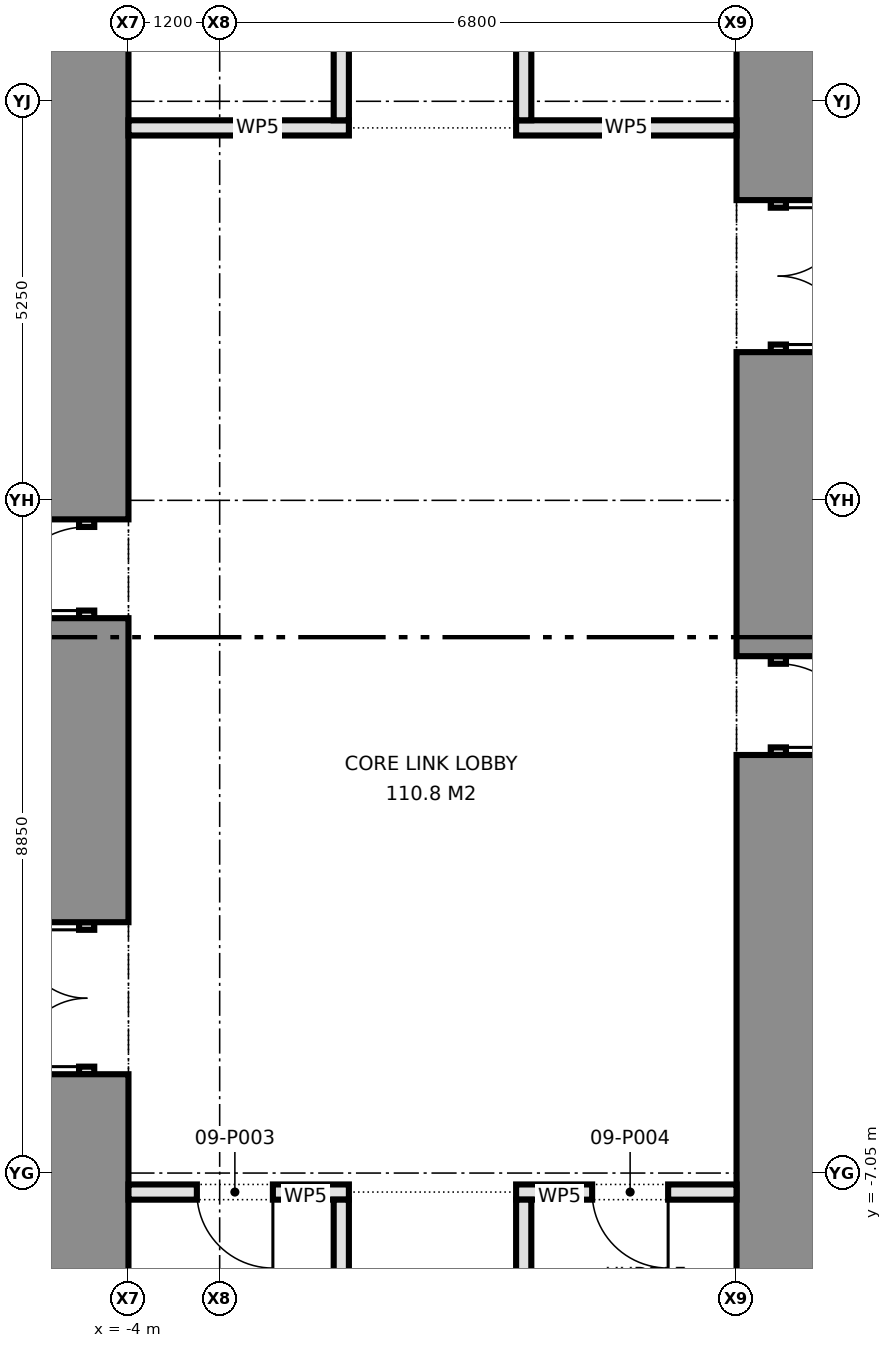
"""IFC4 building model, lengths in metres.
Left out: names, types, materials, properties, quantities, classifications, styles, units other than length and angle.
Written with IfcOpenShell. Run it as: python <this file> out.ifc"""

import sys

from ifc_helpers import new_model, si_unit, direction, frame, frame_2d, origin, place, context, subcontext, project, spatial, rectangle, extrude, element, fill, save


model = new_model("IFC4")
c1 = context("Model", 3, precision=1e-05, world=origin(), true_north=direction((0.0, 1.0)))
c2 = subcontext(c1, "Body", "Model", "MODEL_VIEW")
j1 = project(units=[si_unit("LENGTHUNIT", "METRE"), si_unit("PLANEANGLEUNIT", "RADIAN")], contexts=[c1])
p1 = place(None, origin())
s1 = spatial("IfcSite", under=j1, at=p1, CompositionType="ELEMENT")
p2 = place(p1, origin())
s2 = spatial("IfcBuilding", under=s1, at=p2, CompositionType="ELEMENT")
p3 = place(p2, frame((0.0, 0.0, 40.1)))
s3 = spatial("IfcBuildingStorey", under=s2, at=p3, CompositionType="ELEMENT", Elevation=40.1)
p4 = place(p3, frame((-4.55, -8.9, 0.0), z_axis=(0.0, 0.0, 1.0), x_axis=(0.0, 1.0, 0.0)))
e1 = element("IfcWall", 1, at=p4, inside=s3, PredefinedType="SHEAR", context=c2, shape_type="SweptSolid", body=[
    extrude(rectangle(XDim=3.15, YDim=1.1, at=frame_2d((1.575, 0.0))), origin(), (0.0, 0.0, 1.0), 4.575),
])
p5 = place(p3, frame((-4.55, -5.75, 0.0), z_axis=(0.0, 0.0, 1.0), x_axis=(0.0, 1.0, 0.0)))
e2 = element("IfcWall", 2, at=p5, inside=s3, PredefinedType="PARTITIONING", context=c2, shape_type="SweptSolid", body=[
    extrude(rectangle(XDim=2.0, YDim=0.2, at=frame_2d((1.0, 0.0))), origin(), (0.0, 0.0, 1.0), 2.4),
])
p6 = place(p5, frame((0.1, 0.0, 0.0)))
e3 = element("IfcOpeningElement", 3, at=p6, cuts=e2, PredefinedType="OPENING", context=c2, shape_type="SweptSolid", body=[
    extrude(rectangle(XDim=1.8, YDim=2.1, at=frame_2d((0.9, 1.05))), frame((0.0, 0.11, 0.0), z_axis=(0.0, -1.0, 0.0), x_axis=(1.0, 0.0, 0.0)), (0.0, 0.0, 1.0), 0.22),
])
p7 = place(p3, frame((-4.55, -3.75, 0.0), z_axis=(0.0, 0.0, 1.0), x_axis=(0.0, 1.0, 0.0)))
e4 = element("IfcWall", 4, at=p7, inside=s3, PredefinedType="SHEAR", context=c2, shape_type="SweptSolid", body=[
    extrude(rectangle(XDim=4.0, YDim=1.1, at=frame_2d((2.0, 0.0))), origin(), (0.0, 0.0, 1.0), 4.575),
])
p8 = place(p3, frame((-4.55, 0.25, 0.0), z_axis=(0.0, 0.0, 1.0), x_axis=(0.0, 1.0, 0.0)))
e5 = element("IfcWall", 5, at=p8, inside=s3, PredefinedType="PARTITIONING", context=c2, shape_type="SweptSolid", body=[
    extrude(rectangle(XDim=1.3, YDim=0.2, at=frame_2d((0.65, 0.0))), origin(), (0.0, 0.0, 1.0), 2.4),
])
p9 = place(p8, frame((0.1, 0.0, 0.0)))
e6 = element("IfcOpeningElement", 6, at=p9, cuts=e5, PredefinedType="OPENING", context=c2, shape_type="SweptSolid", body=[
    extrude(rectangle(XDim=1.1, YDim=2.1, at=frame_2d((0.55, 1.05))), frame((0.0, 0.11, 0.0), z_axis=(0.0, -1.0, 0.0), x_axis=(1.0, 0.0, 0.0)), (0.0, 0.0, 1.0), 0.22),
])
p10 = place(p3, frame((-4.55, 1.55, 0.0), z_axis=(0.0, 0.0, 1.0), x_axis=(0.0, 1.0, 0.0)))
e7 = element("IfcWall", 7, at=p10, inside=s3, PredefinedType="SHEAR", context=c2, shape_type="SweptSolid", body=[
    extrude(rectangle(XDim=7.35, YDim=1.1, at=frame_2d((3.675, 0.0))), origin(), (0.0, 0.0, 1.0), 4.575),
])
p11 = place(p3, frame((4.55, 8.9, 0.0), z_axis=(0.0, 0.0, 1.0), x_axis=(0.0, -1.0, 0.0)))
e8 = element("IfcWall", 8, at=p11, inside=s3, PredefinedType="SHEAR", context=c2, shape_type="SweptSolid", body=[
    extrude(rectangle(XDim=3.15, YDim=1.1, at=frame_2d((1.575, 0.0))), origin(), (0.0, 0.0, 1.0), 4.575),
])
p12 = place(p3, frame((4.55, 5.75, 0.0), z_axis=(0.0, 0.0, 1.0), x_axis=(0.0, -1.0, 0.0)))
e9 = element("IfcWall", 9, at=p12, inside=s3, PredefinedType="PARTITIONING", context=c2, shape_type="SweptSolid", body=[
    extrude(rectangle(XDim=2.0, YDim=0.2, at=frame_2d((1.0, 0.0))), origin(), (0.0, 0.0, 1.0), 2.4),
])
p13 = place(p12, frame((0.1, 0.0, 0.0)))
e10 = element("IfcOpeningElement", 10, at=p13, cuts=e9, PredefinedType="OPENING", context=c2, shape_type="SweptSolid", body=[
    extrude(rectangle(XDim=1.8, YDim=2.1, at=frame_2d((0.9, 1.05))), frame((0.0, 0.11, 0.0), z_axis=(0.0, -1.0, 0.0), x_axis=(1.0, 0.0, 0.0)), (0.0, 0.0, 1.0), 0.22),
])
p14 = place(p3, frame((4.55, 3.75, 0.0), z_axis=(0.0, 0.0, 1.0), x_axis=(0.0, -1.0, 0.0)))
e11 = element("IfcWall", 11, at=p14, inside=s3, PredefinedType="SHEAR", context=c2, shape_type="SweptSolid", body=[
    extrude(rectangle(XDim=4.0, YDim=1.1, at=frame_2d((2.0, 0.0))), origin(), (0.0, 0.0, 1.0), 4.575),
])
p15 = place(p3, frame((4.55, -0.25, 0.0), z_axis=(0.0, 0.0, 1.0), x_axis=(0.0, -1.0, 0.0)))
e12 = element("IfcWall", 12, at=p15, inside=s3, PredefinedType="PARTITIONING", context=c2, shape_type="SweptSolid", body=[
    extrude(rectangle(XDim=1.3, YDim=0.2, at=frame_2d((0.65, 0.0))), origin(), (0.0, 0.0, 1.0), 2.4),
])
p16 = place(p15, frame((0.1, 0.0, 0.0)))
e13 = element("IfcOpeningElement", 13, at=p16, cuts=e12, PredefinedType="OPENING", context=c2, shape_type="SweptSolid", body=[
    extrude(rectangle(XDim=1.1, YDim=2.1, at=frame_2d((0.55, 1.05))), frame((0.0, 0.11, 0.0), z_axis=(0.0, -1.0, 0.0), x_axis=(1.0, 0.0, 0.0)), (0.0, 0.0, 1.0), 0.22),
])
p17 = place(p3, frame((4.55, -1.55, 0.0), z_axis=(0.0, 0.0, 1.0), x_axis=(0.0, -1.0, 0.0)))
e14 = element("IfcWall", 14, at=p17, inside=s3, PredefinedType="SHEAR", context=c2, shape_type="SweptSolid", body=[
    extrude(rectangle(XDim=7.35, YDim=1.1, at=frame_2d((3.675, 0.0))), origin(), (0.0, 0.0, 1.0), 4.575),
])
p18 = place(p3, frame((-4.0, -7.3, 0.0), z_axis=(0.0, 0.0, 1.0), x_axis=(1.0, 0.0, 0.0)))
e15 = element("IfcWall", 15, at=p18, inside=s3, PredefinedType="PARTITIONING", context=c2, shape_type="SweptSolid", body=[
    extrude(rectangle(XDim=2.9, YDim=0.2, at=frame_2d((1.45, 0.0))), origin(), (0.0, 0.0, 1.0), 4.575),
])
p19 = place(p18, frame((0.9, 0.0, 0.0)))
e16 = element("IfcOpeningElement", 16, at=p19, cuts=e15, PredefinedType="OPENING", context=c2, shape_type="SweptSolid", body=[
    extrude(rectangle(XDim=1.0, YDim=2.1, at=frame_2d((0.5, 1.05))), frame((0.0, 0.11, 0.0), z_axis=(0.0, -1.0, 0.0), x_axis=(1.0, 0.0, 0.0)), (0.0, 0.0, 1.0), 0.22),
])
p20 = place(p3, frame((1.1, -7.3, 0.0), z_axis=(0.0, 0.0, 1.0), x_axis=(1.0, 0.0, 0.0)))
e17 = element("IfcWall", 17, at=p20, inside=s3, PredefinedType="PARTITIONING", context=c2, shape_type="SweptSolid", body=[
    extrude(rectangle(XDim=2.9, YDim=0.2, at=frame_2d((1.45, 0.0))), origin(), (0.0, 0.0, 1.0), 4.575),
])
p21 = place(p20, frame((1.0, 0.0, 0.0)))
e18 = element("IfcOpeningElement", 18, at=p21, cuts=e17, PredefinedType="OPENING", context=c2, shape_type="SweptSolid", body=[
    extrude(rectangle(XDim=1.0, YDim=2.1, at=frame_2d((0.5, 1.05))), frame((0.0, 0.11, 0.0), z_axis=(0.0, -1.0, 0.0), x_axis=(1.0, 0.0, 0.0)), (0.0, 0.0, 1.0), 0.22),
])
for number, where, z_axis, x_axis in (
    (19, (-4.0, 6.7, 0.0), (0.0, 0.0, 1.0), (1.0, 0.0, 0.0)),
    (20, (1.1, 6.7, 0.0), (0.0, 0.0, 1.0), (1.0, 0.0, 0.0)),
):
    element("IfcWall", number, at=place(p3, frame(where, z_axis=z_axis, x_axis=x_axis)), inside=s3, PredefinedType="PARTITIONING", context=c2, shape_type="SweptSolid", body=[
        extrude(rectangle(XDim=2.9, YDim=0.2, at=frame_2d((1.45, 0.0))), origin(), (0.0, 0.0, 1.0), 4.575),
    ])
p22 = place(p3, frame((1.2, -9.9, 0.0), z_axis=(0.0, 0.0, 1.0), x_axis=(0.0, 1.0, 0.0)))
e21 = element("IfcWall", 21, at=p22, inside=s3, PredefinedType="PARTITIONING", context=c2, shape_type="SweptSolid", body=[
    extrude(rectangle(XDim=2.5, YDim=0.2, at=frame_2d((1.25, 0.0))), origin(), (0.0, 0.0, 1.0), 4.575),
])
p23 = place(p3, frame((1.2, 6.8, 0.0), z_axis=(0.0, 0.0, 1.0), x_axis=(0.0, 1.0, 0.0)))
e22 = element("IfcWall", 22, at=p23, inside=s3, PredefinedType="PARTITIONING", context=c2, shape_type="SweptSolid", body=[
    extrude(rectangle(XDim=3.1, YDim=0.2, at=frame_2d((1.55, 0.0))), origin(), (0.0, 0.0, 1.0), 4.575),
])
p24 = place(p23, frame((1.05, 0.0, 0.0)))
e23 = element("IfcOpeningElement", 23, at=p24, cuts=e22, PredefinedType="OPENING", context=c2, shape_type="SweptSolid", body=[
    extrude(rectangle(XDim=1.0, YDim=2.1, at=frame_2d((0.5, 1.05))), frame((0.0, 0.11, 0.0), z_axis=(0.0, -1.0, 0.0), x_axis=(1.0, 0.0, 0.0)), (0.0, 0.0, 1.0), 0.22),
])
p25 = place(p3, frame((-1.2, -9.9, 0.0), z_axis=(0.0, 0.0, 1.0), x_axis=(0.0, 1.0, 0.0)))
e24 = element("IfcWall", 24, at=p25, inside=s3, PredefinedType="PARTITIONING", context=c2, shape_type="SweptSolid", body=[
    extrude(rectangle(XDim=2.5, YDim=0.2, at=frame_2d((1.25, 0.0))), origin(), (0.0, 0.0, 1.0), 4.575),
])
p26 = place(p3, frame((-1.2, 6.8, 0.0), z_axis=(0.0, 0.0, 1.0), x_axis=(0.0, 1.0, 0.0)))
e25 = element("IfcWall", 25, at=p26, inside=s3, PredefinedType="PARTITIONING", context=c2, shape_type="SweptSolid", body=[
    extrude(rectangle(XDim=3.1, YDim=0.2, at=frame_2d((1.55, 0.0))), origin(), (0.0, 0.0, 1.0), 4.575),
])
p27 = place(p26, frame((1.05, 0.0, 0.0)))
e26 = element("IfcOpeningElement", 26, at=p27, cuts=e25, PredefinedType="OPENING", context=c2, shape_type="SweptSolid", body=[
    extrude(rectangle(XDim=1.0, YDim=2.1, at=frame_2d((0.5, 1.05))), frame((0.0, 0.11, 0.0), z_axis=(0.0, -1.0, 0.0), x_axis=(1.0, 0.0, 0.0)), (0.0, 0.0, 1.0), 0.22),
])
p28 = place(p6, origin())
e27 = element("IfcDoor", 27, at=p28, inside=s3, OperationType="DOUBLE_DOOR_SINGLE_SWING", PredefinedType="DOOR", context=c2, shape_type="SweptSolid", body=[
    extrude(rectangle(XDim=1.8, YDim=2.1, at=frame_2d((0.9, 1.05))), frame((0.0, 0.025, 0.0), z_axis=(0.0, -1.0, 0.0), x_axis=(1.0, 0.0, 0.0)), (0.0, 0.0, 1.0), 0.05),
])
fill(e3, e27)
p29 = place(p9, origin())
e28 = element("IfcDoor", 28, at=p29, inside=s3, OperationType="SINGLE_SWING_LEFT", PredefinedType="DOOR", context=c2, shape_type="SweptSolid", body=[
    extrude(rectangle(XDim=1.1, YDim=2.1, at=frame_2d((0.55, 1.05))), frame((0.0, 0.025, 0.0), z_axis=(0.0, -1.0, 0.0), x_axis=(1.0, 0.0, 0.0)), (0.0, 0.0, 1.0), 0.05),
])
fill(e6, e28)
p30 = place(p13, origin())
e29 = element("IfcDoor", 29, at=p30, inside=s3, OperationType="DOUBLE_DOOR_SINGLE_SWING", PredefinedType="DOOR", context=c2, shape_type="SweptSolid", body=[
    extrude(rectangle(XDim=1.8, YDim=2.1, at=frame_2d((0.9, 1.05))), frame((0.0, 0.025, 0.0), z_axis=(0.0, -1.0, 0.0), x_axis=(1.0, 0.0, 0.0)), (0.0, 0.0, 1.0), 0.05),
])
fill(e10, e29)
p31 = place(p16, origin())
e30 = element("IfcDoor", 30, at=p31, inside=s3, OperationType="SINGLE_SWING_RIGHT", PredefinedType="DOOR", context=c2, shape_type="SweptSolid", body=[
    extrude(rectangle(XDim=1.1, YDim=2.1, at=frame_2d((0.55, 1.05))), frame((0.0, 0.025, 0.0), z_axis=(0.0, -1.0, 0.0), x_axis=(1.0, 0.0, 0.0)), (0.0, 0.0, 1.0), 0.05),
])
fill(e13, e30)
p32 = place(p19, frame((1.0, 0.0, 0.0), z_axis=(0.0, 0.0, 1.0), x_axis=(-1.0, 0.0, 0.0)))
e31 = element("IfcDoor", 31, at=p32, inside=s3, OperationType="SINGLE_SWING_LEFT", PredefinedType="DOOR", context=c2, shape_type="SweptSolid", body=[
    extrude(rectangle(XDim=1.0, YDim=2.1, at=frame_2d((0.5, 1.05))), frame((0.0, 0.025, 0.0), z_axis=(0.0, -1.0, 0.0), x_axis=(1.0, 0.0, 0.0)), (0.0, 0.0, 1.0), 0.05),
])
fill(e16, e31)
p33 = place(p21, frame((1.0, 0.0, 0.0), z_axis=(0.0, 0.0, 1.0), x_axis=(-1.0, 0.0, 0.0)))
e32 = element("IfcDoor", 32, at=p33, inside=s3, OperationType="SINGLE_SWING_LEFT", PredefinedType="DOOR", context=c2, shape_type="SweptSolid", body=[
    extrude(rectangle(XDim=1.0, YDim=2.1, at=frame_2d((0.5, 1.05))), frame((0.0, 0.025, 0.0), z_axis=(0.0, -1.0, 0.0), x_axis=(1.0, 0.0, 0.0)), (0.0, 0.0, 1.0), 0.05),
])
fill(e18, e32)
save(model, sys.argv[1])
